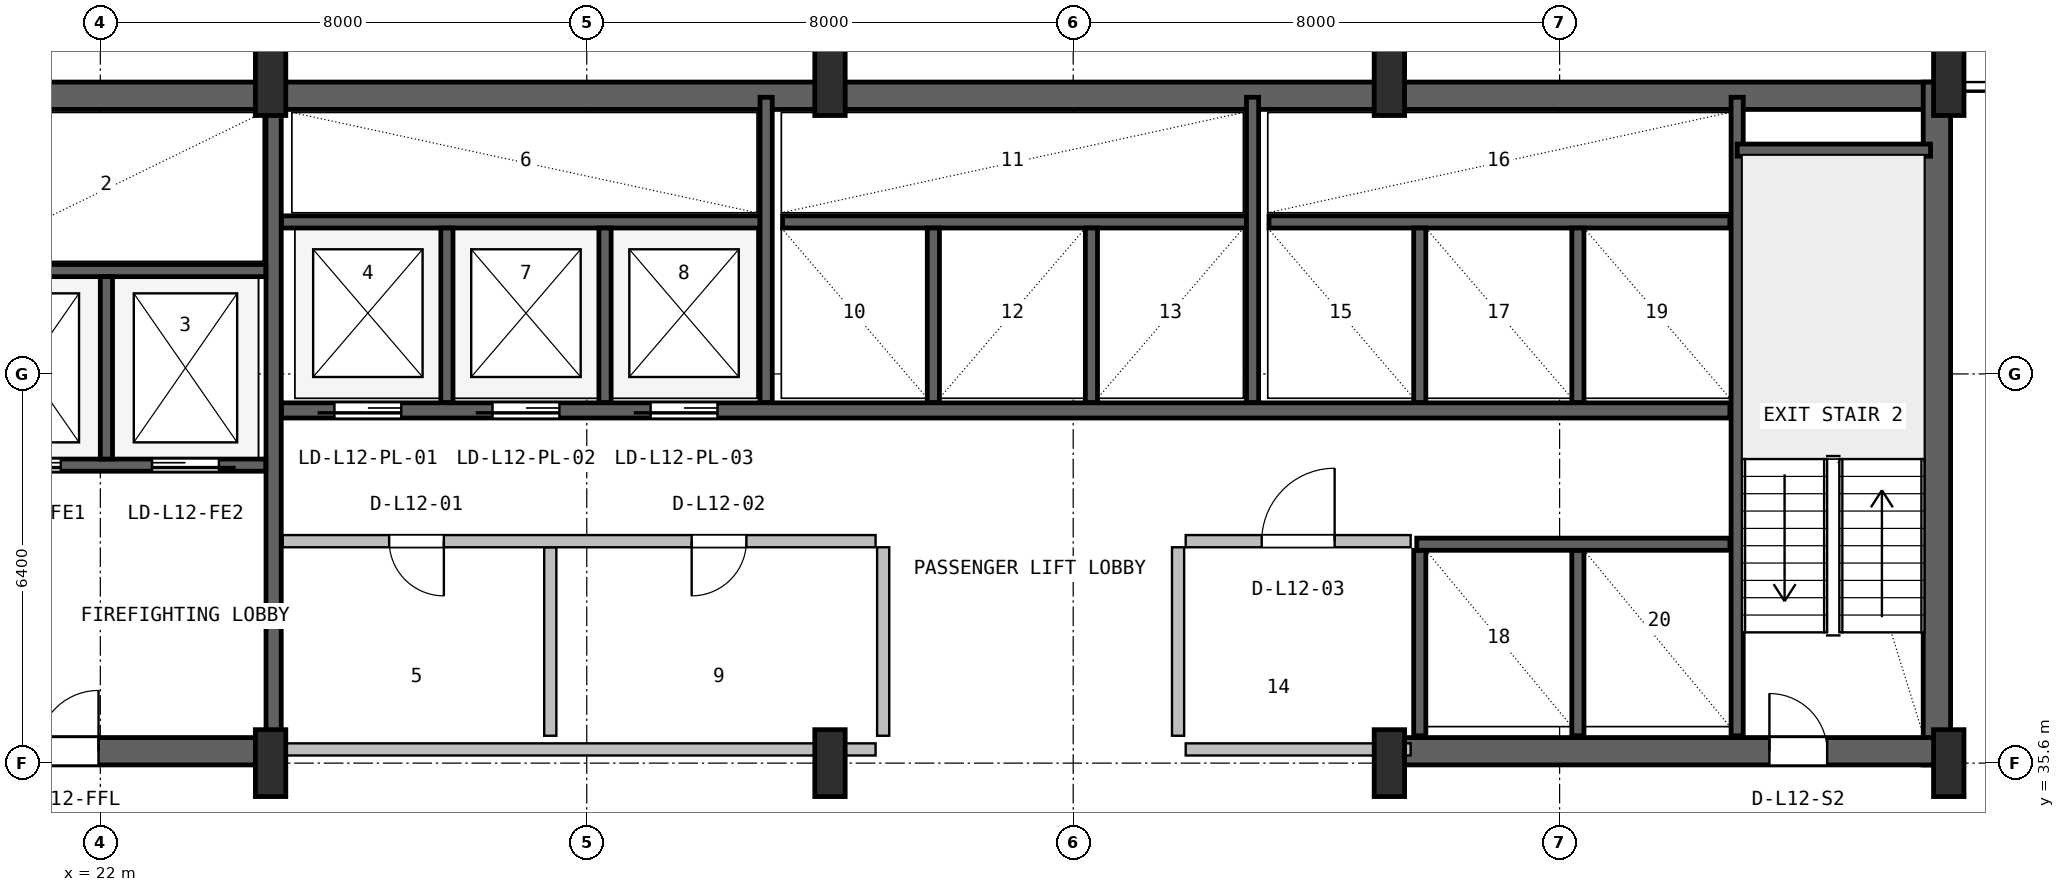
"""IFC4 building model, lengths in metres.
Left out: names, types, materials, properties, quantities, classifications, styles, units other than length and angle.
Written with IfcOpenShell. Run it as: python <this file> out.ifc"""

import sys

from ifc_helpers import new_model, si_unit, direction, frame, frame_2d, origin, origin_2d, place, context, subcontext, project, spatial, rectangle, i_section, extrude, source, transform, mapped, element, fill, save


model = new_model("IFC4")
c1 = context("Model", 3, precision=1e-05, world=origin(), true_north=direction((0.0, 1.0)))
c2 = subcontext(c1, "Body", "Model", "MODEL_VIEW")
j1 = project(units=[si_unit("LENGTHUNIT", "METRE"), si_unit("PLANEANGLEUNIT", "RADIAN")], contexts=[c1])
p1 = place(None, origin())
s1 = spatial("IfcSite", under=j1, at=p1, CompositionType="ELEMENT")
p2 = place(p1, origin())
s2 = spatial("IfcBuilding", under=s1, at=p2, CompositionType="ELEMENT")
p3 = place(p2, frame((0.0, 0.0, 54.9)))
s3 = spatial("IfcBuildingStorey", under=s2, at=p3, CompositionType="ELEMENT", Elevation=54.9)
p4 = place(p3, frame((15.6, 46.575, 0.0), z_axis=(0.0, 0.0, 1.0), x_axis=(1.0, 0.0, 0.0)))
e1 = element("IfcWall", 1, at=p4, inside=s3, PredefinedType="SHEAR", context=c2, shape_type="SweptSolid", body=[
    extrude(rectangle(XDim=36.8, YDim=0.45, at=frame_2d((18.4, 0.0))), origin(), (0.0, 0.0, 1.0), 3.65),
])
p5 = place(p3, frame((52.205, 35.57, 0.0), z_axis=(0.0, 0.0, 1.0), x_axis=(0.0, 1.0, 0.0)))
e2 = element("IfcWall", 2, at=p5, inside=s3, PredefinedType="SHEAR", context=c2, shape_type="SweptSolid", body=[
    extrude(rectangle(XDim=11.23, YDim=0.45, at=frame_2d((5.615, 0.0))), origin(), (0.0, 0.0, 1.0), 3.65),
])
p6 = place(p3, frame((15.57, 35.795, 0.0), z_axis=(0.0, 0.0, 1.0), x_axis=(1.0, 0.0, 0.0)))
e3 = element("IfcWall", 3, at=p6, inside=s3, PredefinedType="SHEAR", context=c2, shape_type="SweptSolid", body=[
    extrude(rectangle(XDim=9.23, YDim=0.45, at=frame_2d((4.615, 0.0))), origin(), (0.0, 0.0, 1.0), 3.65),
])
p7 = place(p6, frame((5.4, 0.0, 0.0)))
e4 = element("IfcOpeningElement", 4, at=p7, cuts=e3, PredefinedType="OPENING", context=c2, shape_type="SweptSolid", body=[
    extrude(rectangle(XDim=1.0, YDim=2.1, at=frame_2d((0.5, 1.05))), frame((0.0, 0.235, 0.0), z_axis=(0.0, -1.0, 0.0), x_axis=(1.0, 0.0, 0.0)), (0.0, 0.0, 1.0), 0.47),
])
p8 = place(p3, frame((43.2, 35.795, 0.0), z_axis=(0.0, 0.0, 1.0), x_axis=(1.0, 0.0, 0.0)))
e5 = element("IfcWall", 5, at=p8, inside=s3, PredefinedType="SHEAR", context=c2, shape_type="SweptSolid", body=[
    extrude(rectangle(XDim=9.23, YDim=0.45, at=frame_2d((4.615, 0.0))), origin(), (0.0, 0.0, 1.0), 3.65),
])
p9 = place(p8, frame((6.25, 0.0, 0.0)))
e6 = element("IfcOpeningElement", 6, at=p9, cuts=e5, PredefinedType="OPENING", context=c2, shape_type="SweptSolid", body=[
    extrude(rectangle(XDim=0.95, YDim=2.1, at=frame_2d((0.475, 1.05))), frame((0.0, 0.235, 0.0), z_axis=(0.0, -1.0, 0.0), x_axis=(1.0, 0.0, 0.0)), (0.0, 0.0, 1.0), 0.47),
])
m1 = source(origin(), c2, "Body", "SweptSolid", [
    extrude(i_section(OverallWidth=0.5, OverallDepth=1.1, WebThickness=0.018, FlangeThickness=0.032, FilletRadius=0.018, at=origin_2d()), origin(), (0.0, 0.0, 1.0), 3.9),
])
for number, where, z_axis, x_axis in (
    (7, (24.8, 35.6, 0.0), (0.0, 0.0, 1.0), (1.0, 0.0, 0.0)),
    (8, (24.8, 46.8, 0.0), (0.0, 0.0, 1.0), (1.0, 0.0, 0.0)),
    (9, (34.0, 35.6, 0.0), (0.0, 0.0, 1.0), (1.0, 0.0, 0.0)),
    (10, (34.0, 46.8, 0.0), (0.0, 0.0, 1.0), (1.0, 0.0, 0.0)),
    (11, (43.2, 35.6, 0.0), (0.0, 0.0, 1.0), (1.0, 0.0, 0.0)),
    (12, (43.2, 46.8, 0.0), (0.0, 0.0, 1.0), (1.0, 0.0, 0.0)),
    (13, (52.4, 35.6, 0.0), (0.0, 0.0, 1.0), (1.0, 0.0, 0.0)),
    (14, (52.4, 46.8, 0.0), (0.0, 0.0, 1.0), (1.0, 0.0, 0.0)),
):
    element("IfcColumn", number, at=place(p3, frame(where, z_axis=z_axis, x_axis=x_axis)), inside=s3, PredefinedType="COLUMN", context=c2, shape_type="MappedRepresentation", body=[
        mapped(m1, transform((0.0, 0.0, 0.0), x_axis=(1.0, 0.0, 0.0), y_axis=(0.0, 1.0, 0.0), z_axis=(0.0, 0.0, 1.0), scale=1.0)),
    ])
p10 = place(p3, frame((24.85, 36.05, 0.0), z_axis=(0.0, 0.0, 1.0), x_axis=(0.0, 1.0, 0.0)))
e15 = element("IfcWall", 15, at=p10, inside=s3, PredefinedType="SHEAR", context=c2, shape_type="SweptSolid", body=[
    extrude(rectangle(XDim=10.45, YDim=0.25, at=frame_2d((5.225, 0.0))), origin(), (0.0, 0.0, 1.0), 3.65),
])
p11 = place(p3, frame((19.2, 40.5, 0.0), z_axis=(0.0, 0.0, 1.0), x_axis=(1.0, 0.0, 0.0)))
e16 = element("IfcWall", 16, at=p11, inside=s3, PredefinedType="SHEAR", context=c2, shape_type="SweptSolid", body=[
    extrude(rectangle(XDim=5.52, YDim=0.2, at=frame_2d((2.76, 0.0))), origin(), (0.0, 0.0, 1.0), 3.65),
])
p12 = place(p11, frame((1.05, 0.0, 0.0)))
e17 = element("IfcOpeningElement", 17, at=p12, cuts=e16, PredefinedType="OPENING", context=c2, shape_type="SweptSolid", body=[
    extrude(rectangle(XDim=1.1, YDim=2.18, at=frame_2d((0.55, 1.09))), frame((0.0, 0.11, 0.0), z_axis=(0.0, -1.0, 0.0), x_axis=(1.0, 0.0, 0.0)), (0.0, 0.0, 1.0), 0.22),
])
p13 = place(p11, frame((3.65, 0.0, 0.0)))
e18 = element("IfcOpeningElement", 18, at=p13, cuts=e16, PredefinedType="OPENING", context=c2, shape_type="SweptSolid", body=[
    extrude(rectangle(XDim=1.1, YDim=2.18, at=frame_2d((0.55, 1.09))), frame((0.0, 0.11, 0.0), z_axis=(0.0, -1.0, 0.0), x_axis=(1.0, 0.0, 0.0)), (0.0, 0.0, 1.0), 0.22),
])
p14 = place(p3, frame((19.2, 43.7, 0.0), z_axis=(0.0, 0.0, 1.0), x_axis=(1.0, 0.0, 0.0)))
e19 = element("IfcWall", 19, at=p14, inside=s3, PredefinedType="SHEAR", context=c2, shape_type="SweptSolid", body=[
    extrude(rectangle(XDim=5.52, YDim=0.2, at=frame_2d((2.76, 0.0))), origin(), (0.0, 0.0, 1.0), 3.65),
])
p15 = place(p3, frame((22.1, 40.6, 0.0), z_axis=(0.0, 0.0, 1.0), x_axis=(0.0, 1.0, 0.0)))
e20 = element("IfcWall", 20, at=p15, inside=s3, PredefinedType="SHEAR", context=c2, shape_type="SweptSolid", body=[
    extrude(rectangle(XDim=3.0, YDim=0.2, at=frame_2d((1.5, 0.0))), origin(), (0.0, 0.0, 1.0), 3.65),
])
p16 = place(p3, frame((48.92, 36.05, 0.0), z_axis=(0.0, 0.0, 1.0), x_axis=(0.0, 1.0, 0.0)))
e21 = element("IfcWall", 21, at=p16, inside=s3, PredefinedType="SHEAR", context=c2, shape_type="SweptSolid", body=[
    extrude(rectangle(XDim=10.5, YDim=0.2, at=frame_2d((5.25, 0.0))), origin(), (0.0, 0.0, 1.0), 3.65),
])
p17 = place(p3, frame((48.92, 45.68, 0.0), z_axis=(0.0, 0.0, 1.0), x_axis=(1.0, 0.0, 0.0)))
e22 = element("IfcWall", 22, at=p17, inside=s3, PredefinedType="SHEAR", context=c2, shape_type="SweptSolid", body=[
    extrude(rectangle(XDim=3.18, YDim=0.2, at=frame_2d((1.59, 0.0))), origin(), (0.0, 0.0, 1.0), 3.65),
])
p18 = place(p3, frame((24.98, 41.4, 0.0), z_axis=(0.0, 0.0, 1.0), x_axis=(1.0, 0.0, 0.0)))
e23 = element("IfcWall", 23, at=p18, inside=s3, PredefinedType="SHEAR", context=c2, shape_type="SweptSolid", body=[
    extrude(rectangle(XDim=23.82, YDim=0.25, at=frame_2d((11.91, 0.0))), origin(), (0.0, 0.0, 1.0), 3.65),
])
p19 = place(p18, frame((0.87, 0.0, 0.0)))
e24 = element("IfcOpeningElement", 24, at=p19, cuts=e23, PredefinedType="OPENING", context=c2, shape_type="SweptSolid", body=[
    extrude(rectangle(XDim=1.1, YDim=2.18, at=frame_2d((0.55, 1.09))), frame((0.0, 0.135, 0.0), z_axis=(0.0, -1.0, 0.0), x_axis=(1.0, 0.0, 0.0)), (0.0, 0.0, 1.0), 0.27),
])
p20 = place(p18, frame((3.47, 0.0, 0.0)))
e25 = element("IfcOpeningElement", 25, at=p20, cuts=e23, PredefinedType="OPENING", context=c2, shape_type="SweptSolid", body=[
    extrude(rectangle(XDim=1.1, YDim=2.18, at=frame_2d((0.55, 1.09))), frame((0.0, 0.135, 0.0), z_axis=(0.0, -1.0, 0.0), x_axis=(1.0, 0.0, 0.0)), (0.0, 0.0, 1.0), 0.27),
])
p21 = place(p18, frame((6.07, 0.0, 0.0)))
e26 = element("IfcOpeningElement", 26, at=p21, cuts=e23, PredefinedType="OPENING", context=c2, shape_type="SweptSolid", body=[
    extrude(rectangle(XDim=1.1, YDim=2.18, at=frame_2d((0.55, 1.09))), frame((0.0, 0.135, 0.0), z_axis=(0.0, -1.0, 0.0), x_axis=(1.0, 0.0, 0.0)), (0.0, 0.0, 1.0), 0.27),
])
p22 = place(p3, frame((24.98, 44.5, 0.0), z_axis=(0.0, 0.0, 1.0), x_axis=(1.0, 0.0, 0.0)))
e27 = element("IfcWall", 27, at=p22, inside=s3, PredefinedType="SHEAR", context=c2, shape_type="SweptSolid", body=[
    extrude(rectangle(XDim=7.87, YDim=0.2, at=frame_2d((3.935, 0.0))), origin(), (0.0, 0.0, 1.0), 3.65),
])
for number, where, z_axis, x_axis in (
    (28, (27.7, 41.53, 0.0), (0.0, 0.0, 1.0), (0.0, 1.0, 0.0)),
    (29, (30.3, 41.53, 0.0), (0.0, 0.0, 1.0), (0.0, 1.0, 0.0)),
):
    element("IfcWall", number, at=place(p3, frame(where, z_axis=z_axis, x_axis=x_axis)), inside=s3, PredefinedType="SHEAR", context=c2, shape_type="SweptSolid", body=[
        extrude(rectangle(XDim=2.87, YDim=0.2, at=frame_2d((1.435, 0.0))), origin(), (0.0, 0.0, 1.0), 3.65),
    ])
p23 = place(p3, frame((32.95, 41.53, 0.0), z_axis=(0.0, 0.0, 1.0), x_axis=(0.0, 1.0, 0.0)))
e30 = element("IfcWall", 30, at=p23, inside=s3, PredefinedType="SHEAR", context=c2, shape_type="SweptSolid", body=[
    extrude(rectangle(XDim=5.02, YDim=0.2, at=frame_2d((2.51, 0.0))), origin(), (0.0, 0.0, 1.0), 3.65),
])
p24 = place(p3, frame((33.22, 44.5, 0.0), z_axis=(0.0, 0.0, 1.0), x_axis=(1.0, 0.0, 0.0)))
e31 = element("IfcWall", 31, at=p24, inside=s3, PredefinedType="SHEAR", context=c2, shape_type="SweptSolid", body=[
    extrude(rectangle(XDim=7.63, YDim=0.2, at=frame_2d((3.815, 0.0))), origin(), (0.0, 0.0, 1.0), 3.65),
])
for number, where, z_axis, x_axis in (
    (32, (35.7, 41.53, 0.0), (0.0, 0.0, 1.0), (0.0, 1.0, 0.0)),
    (33, (38.3, 41.53, 0.0), (0.0, 0.0, 1.0), (0.0, 1.0, 0.0)),
):
    element("IfcWall", number, at=place(p3, frame(where, z_axis=z_axis, x_axis=x_axis)), inside=s3, PredefinedType="SHEAR", context=c2, shape_type="SweptSolid", body=[
        extrude(rectangle(XDim=2.87, YDim=0.2, at=frame_2d((1.435, 0.0))), origin(), (0.0, 0.0, 1.0), 3.65),
    ])
p25 = place(p3, frame((40.95, 41.53, 0.0), z_axis=(0.0, 0.0, 1.0), x_axis=(0.0, 1.0, 0.0)))
e34 = element("IfcWall", 34, at=p25, inside=s3, PredefinedType="SHEAR", context=c2, shape_type="SweptSolid", body=[
    extrude(rectangle(XDim=5.02, YDim=0.2, at=frame_2d((2.51, 0.0))), origin(), (0.0, 0.0, 1.0), 3.65),
])
p26 = place(p3, frame((41.22, 44.5, 0.0), z_axis=(0.0, 0.0, 1.0), x_axis=(1.0, 0.0, 0.0)))
e35 = element("IfcWall", 35, at=p26, inside=s3, PredefinedType="SHEAR", context=c2, shape_type="SweptSolid", body=[
    extrude(rectangle(XDim=7.58, YDim=0.2, at=frame_2d((3.79, 0.0))), origin(), (0.0, 0.0, 1.0), 3.65),
])
for number, where, z_axis, x_axis in (
    (36, (43.7, 41.53, 0.0), (0.0, 0.0, 1.0), (0.0, 1.0, 0.0)),
    (37, (46.3, 41.53, 0.0), (0.0, 0.0, 1.0), (0.0, 1.0, 0.0)),
):
    element("IfcWall", number, at=place(p3, frame(where, z_axis=z_axis, x_axis=x_axis)), inside=s3, PredefinedType="SHEAR", context=c2, shape_type="SweptSolid", body=[
        extrude(rectangle(XDim=2.87, YDim=0.2, at=frame_2d((1.435, 0.0))), origin(), (0.0, 0.0, 1.0), 3.65),
    ])
for number, where, z_axis, x_axis in (
    (38, (43.7, 36.05, 0.0), (0.0, 0.0, 1.0), (0.0, 1.0, 0.0)),
    (39, (46.3, 36.05, 0.0), (0.0, 0.0, 1.0), (0.0, 1.0, 0.0)),
):
    element("IfcWall", number, at=place(p3, frame(where, z_axis=z_axis, x_axis=x_axis)), inside=s3, PredefinedType="SHEAR", context=c2, shape_type="SweptSolid", body=[
        extrude(rectangle(XDim=3.05, YDim=0.2, at=frame_2d((1.525, 0.0))), origin(), (0.0, 0.0, 1.0), 3.65),
    ])
p27 = place(p3, frame((43.65, 39.2, 0.0), z_axis=(0.0, 0.0, 1.0), x_axis=(1.0, 0.0, 0.0)))
e40 = element("IfcWall", 40, at=p27, inside=s3, PredefinedType="SHEAR", context=c2, shape_type="SweptSolid", body=[
    extrude(rectangle(XDim=5.15, YDim=0.2, at=frame_2d((2.575, 0.0))), origin(), (0.0, 0.0, 1.0), 3.65),
])
p28 = place(p3, frame((25.0, 35.825, 0.0), z_axis=(0.0, 0.0, 1.0), x_axis=(1.0, 0.0, 0.0)))
e41 = element("IfcWall", 41, at=p28, inside=s3, PredefinedType="PLUMBINGWALL", context=c2, shape_type="SweptSolid", body=[
    extrude(rectangle(XDim=9.75, YDim=0.2, at=frame_2d((4.875, 0.0))), origin(), (0.0, 0.0, 1.0), 2.425),
])
p29 = place(p3, frame((29.4, 36.05, 0.0), z_axis=(0.0, 0.0, 1.0), x_axis=(0.0, 1.0, 0.0)))
e42 = element("IfcWall", 42, at=p29, inside=s3, PredefinedType="PLUMBINGWALL", context=c2, shape_type="SweptSolid", body=[
    extrude(rectangle(XDim=3.1, YDim=0.2, at=frame_2d((1.55, 0.0))), origin(), (0.0, 0.0, 1.0), 3.63),
])
p30 = place(p3, frame((25.0, 39.25, 0.0), z_axis=(0.0, 0.0, 1.0), x_axis=(1.0, 0.0, 0.0)))
e43 = element("IfcWall", 43, at=p30, inside=s3, PredefinedType="PLUMBINGWALL", context=c2, shape_type="SweptSolid", body=[
    extrude(rectangle(XDim=9.75, YDim=0.2, at=frame_2d((4.875, 0.0))), origin(), (0.0, 0.0, 1.0), 3.63),
])
p31 = place(p30, frame((1.75, 0.0, 0.0)))
e44 = element("IfcOpeningElement", 44, at=p31, cuts=e43, PredefinedType="OPENING", context=c2, shape_type="SweptSolid", body=[
    extrude(rectangle(XDim=0.9, YDim=2.06, at=frame_2d((0.45, 1.03))), frame((0.0, 0.11, 0.0), z_axis=(0.0, -1.0, 0.0), x_axis=(1.0, 0.0, 0.0)), (0.0, 0.0, 1.0), 0.22),
])
p32 = place(p30, frame((6.725, 0.0, 0.0)))
e45 = element("IfcOpeningElement", 45, at=p32, cuts=e43, PredefinedType="OPENING", context=c2, shape_type="SweptSolid", body=[
    extrude(rectangle(XDim=0.9, YDim=2.06, at=frame_2d((0.45, 1.03))), frame((0.0, 0.11, 0.0), z_axis=(0.0, -1.0, 0.0), x_axis=(1.0, 0.0, 0.0)), (0.0, 0.0, 1.0), 0.22),
])
p33 = place(p3, frame((34.875, 36.05, 0.0), z_axis=(0.0, 0.0, 1.0), x_axis=(0.0, 1.0, 0.0)))
e46 = element("IfcWall", 46, at=p33, inside=s3, PredefinedType="PLUMBINGWALL", context=c2, shape_type="SweptSolid", body=[
    extrude(rectangle(XDim=3.1, YDim=0.2, at=frame_2d((1.55, 0.0))), origin(), (0.0, 0.0, 1.0), 3.63),
])
p34 = place(p3, frame((39.85, 35.825, 0.0), z_axis=(0.0, 0.0, 1.0), x_axis=(1.0, 0.0, 0.0)))
e47 = element("IfcWall", 47, at=p34, inside=s3, PredefinedType="SOLIDWALL", context=c2, shape_type="SweptSolid", body=[
    extrude(rectangle(XDim=3.7, YDim=0.2, at=frame_2d((1.85, 0.0))), origin(), (0.0, 0.0, 1.0), 2.425),
])
p35 = place(p3, frame((39.85, 39.25, 0.0), z_axis=(0.0, 0.0, 1.0), x_axis=(1.0, 0.0, 0.0)))
e48 = element("IfcWall", 48, at=p35, inside=s3, PredefinedType="SOLIDWALL", context=c2, shape_type="SweptSolid", body=[
    extrude(rectangle(XDim=3.7, YDim=0.2, at=frame_2d((1.85, 0.0))), origin(), (0.0, 0.0, 1.0), 3.63),
])
p36 = place(p35, frame((1.25, 0.0, 0.0)))
e49 = element("IfcOpeningElement", 49, at=p36, cuts=e48, PredefinedType="OPENING", context=c2, shape_type="SweptSolid", body=[
    extrude(rectangle(XDim=1.2, YDim=2.1, at=frame_2d((0.6, 1.05))), frame((0.0, 0.11, 0.0), z_axis=(0.0, -1.0, 0.0), x_axis=(1.0, 0.0, 0.0)), (0.0, 0.0, 1.0), 0.22),
])
p37 = place(p3, frame((39.725, 36.05, 0.0), z_axis=(0.0, 0.0, 1.0), x_axis=(0.0, 1.0, 0.0)))
e50 = element("IfcWall", 50, at=p37, inside=s3, PredefinedType="SOLIDWALL", context=c2, shape_type="SweptSolid", body=[
    extrude(rectangle(XDim=3.1, YDim=0.2, at=frame_2d((1.55, 0.0))), origin(), (0.0, 0.0, 1.0), 3.63),
])
m2 = source(origin(), c2, "Body", "SweptSolid", [
    extrude(rectangle(XDim=1.0, YDim=2.1, at=frame_2d((0.5, 1.05))), frame((0.0, 0.025, 0.0), z_axis=(0.0, -1.0, 0.0), x_axis=(1.0, 0.0, 0.0)), (0.0, 0.0, 1.0), 0.05),
])
p38 = place(p7, origin())
e51 = element("IfcDoor", 51, at=p38, inside=s3, OperationType="SINGLE_SWING_RIGHT", PredefinedType="DOOR", context=c2, shape_type="MappedRepresentation", body=[
    mapped(m2, transform((0.0, 0.0, 0.0), x_axis=(1.0, 0.0, 0.0), y_axis=(0.0, 1.0, 0.0), z_axis=(0.0, 0.0, 1.0), scale=1.0)),
])
fill(e4, e51)
m3 = source(origin(), c2, "Body", "SweptSolid", [
    extrude(rectangle(XDim=1.1, YDim=2.18, at=frame_2d((0.55, 1.09))), frame((0.0, 0.025, 0.0), z_axis=(0.0, -1.0, 0.0), x_axis=(1.0, 0.0, 0.0)), (0.0, 0.0, 1.0), 0.05),
])
p39 = place(p12, frame((1.1, 0.0, 0.0), z_axis=(0.0, 0.0, 1.0), x_axis=(-1.0, 0.0, 0.0)))
e52 = element("IfcDoor", 52, at=p39, inside=s3, OperationType="SLIDING_TO_LEFT", PredefinedType="DOOR", context=c2, shape_type="MappedRepresentation", body=[
    mapped(m3, transform((0.0, 0.0, 0.0), x_axis=(1.0, 0.0, 0.0), y_axis=(0.0, 1.0, 0.0), z_axis=(0.0, 0.0, 1.0), scale=1.0)),
])
fill(e17, e52)
p40 = place(p13, frame((1.1, 0.0, 0.0), z_axis=(0.0, 0.0, 1.0), x_axis=(-1.0, 0.0, 0.0)))
e53 = element("IfcDoor", 53, at=p40, inside=s3, OperationType="SLIDING_TO_RIGHT", PredefinedType="DOOR", context=c2, shape_type="MappedRepresentation", body=[
    mapped(m3, transform((0.0, 0.0, 0.0), x_axis=(1.0, 0.0, 0.0), y_axis=(0.0, 1.0, 0.0), z_axis=(0.0, 0.0, 1.0), scale=1.0)),
])
fill(e18, e53)
m4 = source(origin(), c2, "Body", "SweptSolid", [
    extrude(rectangle(XDim=0.95, YDim=2.1, at=frame_2d((0.475, 1.05))), frame((0.0, 0.025, 0.0), z_axis=(0.0, -1.0, 0.0), x_axis=(1.0, 0.0, 0.0)), (0.0, 0.0, 1.0), 0.05),
])
p41 = place(p9, origin())
e54 = element("IfcDoor", 54, at=p41, inside=s3, OperationType="SINGLE_SWING_LEFT", PredefinedType="DOOR", context=c2, shape_type="MappedRepresentation", body=[
    mapped(m4, transform((0.0, 0.0, 0.0), x_axis=(1.0, 0.0, 0.0), y_axis=(0.0, 1.0, 0.0), z_axis=(0.0, 0.0, 1.0), scale=1.0)),
])
fill(e6, e54)
p42 = place(p19, frame((1.1, 0.0, 0.0), z_axis=(0.0, 0.0, 1.0), x_axis=(-1.0, 0.0, 0.0)))
e55 = element("IfcDoor", 55, at=p42, inside=s3, OperationType="SLIDING_TO_LEFT", PredefinedType="DOOR", context=c2, shape_type="MappedRepresentation", body=[
    mapped(m3, transform((0.0, 0.0, 0.0), x_axis=(1.0, 0.0, 0.0), y_axis=(0.0, 1.0, 0.0), z_axis=(0.0, 0.0, 1.0), scale=1.0)),
])
fill(e24, e55)
p43 = place(p20, frame((1.1, 0.0, 0.0), z_axis=(0.0, 0.0, 1.0), x_axis=(-1.0, 0.0, 0.0)))
e56 = element("IfcDoor", 56, at=p43, inside=s3, OperationType="SLIDING_TO_LEFT", PredefinedType="DOOR", context=c2, shape_type="MappedRepresentation", body=[
    mapped(m3, transform((0.0, 0.0, 0.0), x_axis=(1.0, 0.0, 0.0), y_axis=(0.0, 1.0, 0.0), z_axis=(0.0, 0.0, 1.0), scale=1.0)),
])
fill(e25, e56)
p44 = place(p21, frame((1.1, 0.0, 0.0), z_axis=(0.0, 0.0, 1.0), x_axis=(-1.0, 0.0, 0.0)))
e57 = element("IfcDoor", 57, at=p44, inside=s3, OperationType="SLIDING_TO_LEFT", PredefinedType="DOOR", context=c2, shape_type="MappedRepresentation", body=[
    mapped(m3, transform((0.0, 0.0, 0.0), x_axis=(1.0, 0.0, 0.0), y_axis=(0.0, 1.0, 0.0), z_axis=(0.0, 0.0, 1.0), scale=1.0)),
])
fill(e26, e57)
m5 = source(origin(), c2, "Body", "SweptSolid", [
    extrude(rectangle(XDim=0.9, YDim=2.06, at=frame_2d((0.45, 1.03))), frame((0.0, 0.025, 0.0), z_axis=(0.0, -1.0, 0.0), x_axis=(1.0, 0.0, 0.0)), (0.0, 0.0, 1.0), 0.05),
])
p45 = place(p31, frame((0.9, 0.0, 0.0), z_axis=(0.0, 0.0, 1.0), x_axis=(-1.0, 0.0, 0.0)))
e58 = element("IfcDoor", 58, at=p45, inside=s3, OperationType="SINGLE_SWING_RIGHT", PredefinedType="DOOR", context=c2, shape_type="MappedRepresentation", body=[
    mapped(m5, transform((0.0, 0.0, 0.0), x_axis=(1.0, 0.0, 0.0), y_axis=(0.0, 1.0, 0.0), z_axis=(0.0, 0.0, 1.0), scale=1.0)),
])
fill(e44, e58)
p46 = place(p32, frame((0.9, 0.0, 0.0), z_axis=(0.0, 0.0, 1.0), x_axis=(-1.0, 0.0, 0.0)))
e59 = element("IfcDoor", 59, at=p46, inside=s3, OperationType="SINGLE_SWING_LEFT", PredefinedType="DOOR", context=c2, shape_type="MappedRepresentation", body=[
    mapped(m5, transform((0.0, 0.0, 0.0), x_axis=(1.0, 0.0, 0.0), y_axis=(0.0, 1.0, 0.0), z_axis=(0.0, 0.0, 1.0), scale=1.0)),
])
fill(e45, e59)
m6 = source(origin(), c2, "Body", "SweptSolid", [
    extrude(rectangle(XDim=1.2, YDim=2.1, at=frame_2d((0.6, 1.05))), frame((0.0, 0.025, 0.0), z_axis=(0.0, -1.0, 0.0), x_axis=(1.0, 0.0, 0.0)), (0.0, 0.0, 1.0), 0.05),
])
p47 = place(p36, origin())
e60 = element("IfcDoor", 60, at=p47, inside=s3, OperationType="SINGLE_SWING_RIGHT", PredefinedType="DOOR", context=c2, shape_type="MappedRepresentation", body=[
    mapped(m6, transform((0.0, 0.0, 0.0), x_axis=(1.0, 0.0, 0.0), y_axis=(0.0, 1.0, 0.0), z_axis=(0.0, 0.0, 1.0), scale=1.0)),
])
fill(e49, e60)
save(model, sys.argv[1])
